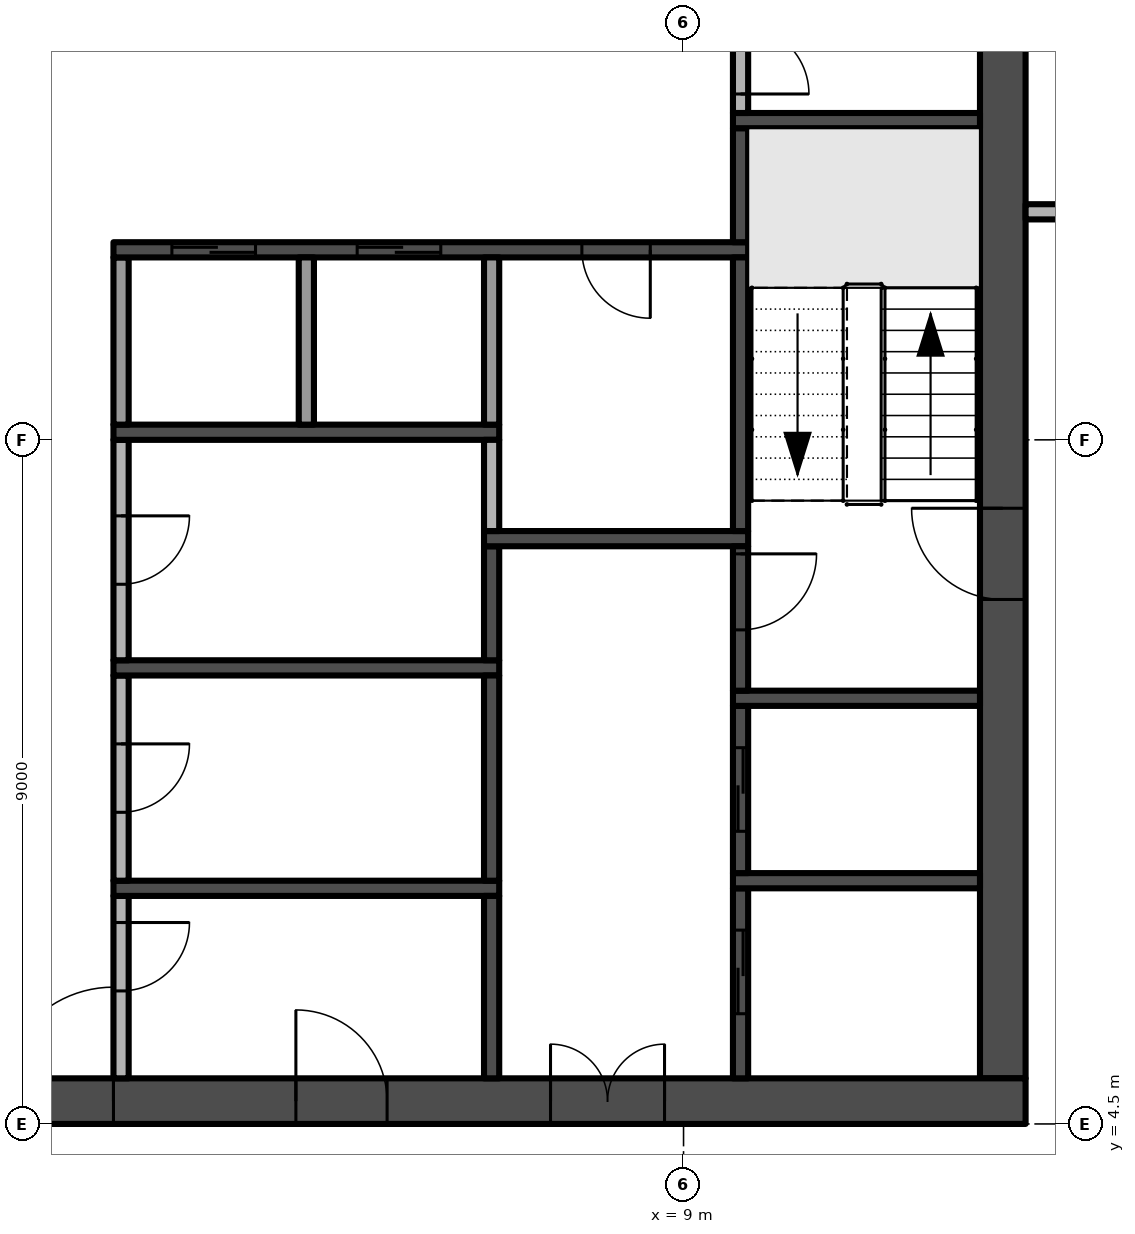
"""IFC4 building model, lengths in metres.
Left out: names, types, materials, properties, quantities, classifications, styles, units other than length and angle.
Written with IfcOpenShell. Run it as: python <this file> out.ifc"""

import sys

from ifc_helpers import new_model, si_unit, direction, frame, frame_2d, origin, place, context, subcontext, project, spatial, rectangle, extrude, element, fill, save


model = new_model("IFC4")
c1 = context("Model", 3, precision=1e-05, world=origin(), true_north=direction((0.0, 1.0)))
c2 = subcontext(c1, "Body", "Model", "MODEL_VIEW")
j1 = project(units=[si_unit("LENGTHUNIT", "METRE"), si_unit("PLANEANGLEUNIT", "RADIAN")], contexts=[c1])
p1 = place(None, origin())
s1 = spatial("IfcSite", under=j1, at=p1, CompositionType="ELEMENT")
p2 = place(p1, origin())
s2 = spatial("IfcBuilding", under=s1, at=p2, CompositionType="ELEMENT")
p3 = place(p2, frame((0.0, 0.0, 226.2)))
s3 = spatial("IfcBuildingStorey", under=s2, at=p3, CompositionType="ELEMENT", Elevation=226.2)
p4 = place(p3, frame((-13.5, 4.8, -0.3), z_axis=(0.0, 0.0, 1.0), x_axis=(1.0, 0.0, 0.0)))
e1 = element("IfcWall", 1, at=p4, inside=s3, PredefinedType="SHEAR", context=c2, shape_type="SweptSolid", body=[
    extrude(rectangle(XDim=27.0, YDim=0.6, at=frame_2d((13.5, 0.0))), origin(), (0.0, 0.0, 1.0), 3.8),
])
p5 = place(p4, frame((12.0, 0.0, 0.3)))
e2 = element("IfcOpeningElement", 2, at=p5, cuts=e1, PredefinedType="OPENING", context=c2, shape_type="SweptSolid", body=[
    extrude(rectangle(XDim=3.0, YDim=2.4, at=frame_2d((1.5, 1.2))), frame((0.0, 0.31, 0.0), z_axis=(0.0, -1.0, 0.0), x_axis=(1.0, 0.0, 0.0)), (0.0, 0.0, 1.0), 0.62),
])
p6 = place(p4, frame((4.9, 0.0, 0.3)))
e3 = element("IfcOpeningElement", 3, at=p6, cuts=e1, PredefinedType="OPENING", context=c2, shape_type="SweptSolid", body=[
    extrude(rectangle(XDim=1.2, YDim=2.2, at=frame_2d((0.6, 1.1))), frame((0.0, 0.31, 0.0), z_axis=(0.0, -1.0, 0.0), x_axis=(1.0, 0.0, 0.0)), (0.0, 0.0, 1.0), 0.62),
])
p7 = place(p4, frame((20.75, 0.0, 0.3)))
e4 = element("IfcOpeningElement", 4, at=p7, cuts=e1, PredefinedType="OPENING", context=c2, shape_type="SweptSolid", body=[
    extrude(rectangle(XDim=1.5, YDim=2.2, at=frame_2d((0.75, 1.1))), frame((0.0, 0.31, 0.0), z_axis=(0.0, -1.0, 0.0), x_axis=(1.0, 0.0, 0.0)), (0.0, 0.0, 1.0), 0.62),
])
p8 = place(p4, frame((17.4, 0.0, 0.3)))
e5 = element("IfcOpeningElement", 5, at=p8, cuts=e1, PredefinedType="OPENING", context=c2, shape_type="SweptSolid", body=[
    extrude(rectangle(XDim=1.2, YDim=2.2, at=frame_2d((0.6, 1.1))), frame((0.0, 0.31, 0.0), z_axis=(0.0, -1.0, 0.0), x_axis=(1.0, 0.0, 0.0)), (0.0, 0.0, 1.0), 0.62),
])
p9 = place(p3, frame((13.2, 5.1, -0.3), z_axis=(0.0, 0.0, 1.0), x_axis=(0.0, 1.0, 0.0)))
e6 = element("IfcWall", 6, at=p9, inside=s3, PredefinedType="SHEAR", context=c2, shape_type="SweptSolid", body=[
    extrude(rectangle(XDim=16.8, YDim=0.6, at=frame_2d((8.4, 0.0))), origin(), (0.0, 0.0, 1.0), 3.8),
])
p10 = place(p9, frame((6.3, 0.0, 0.3)))
e7 = element("IfcOpeningElement", 7, at=p10, cuts=e6, PredefinedType="OPENING", context=c2, shape_type="SweptSolid", body=[
    extrude(rectangle(XDim=1.2, YDim=2.2, at=frame_2d((0.6, 1.1))), frame((0.0, 0.31, 0.0), z_axis=(0.0, -1.0, 0.0), x_axis=(1.0, 0.0, 0.0)), (0.0, 0.0, 1.0), 0.62),
])
p11 = place(p3, frame((1.6, 7.5, 0.0), z_axis=(0.0, 0.0, 1.0), x_axis=(0.0, -1.0, 0.0)))
e8 = element("IfcWall", 8, at=p11, inside=s3, PredefinedType="PARTITIONING", context=c2, shape_type="SweptSolid", body=[
    extrude(rectangle(XDim=2.4, YDim=0.2, at=frame_2d((1.2, 0.0))), origin(), (0.0, 0.0, 1.0), 3.5),
])
p12 = place(p11, frame((0.35, 0.0, 0.0)))
e9 = element("IfcOpeningElement", 9, at=p12, cuts=e8, PredefinedType="OPENING", context=c2, shape_type="SweptSolid", body=[
    extrude(rectangle(XDim=0.9, YDim=2.1, at=frame_2d((0.45, 1.05))), frame((0.0, 0.11, 0.0), z_axis=(0.0, -1.0, 0.0), x_axis=(1.0, 0.0, 0.0)), (0.0, 0.0, 1.0), 0.22),
])
p13 = place(p3, frame((1.5, 7.6, 0.0), z_axis=(0.0, 0.0, 1.0), x_axis=(1.0, 0.0, 0.0)))
e10 = element("IfcWall", 10, at=p13, inside=s3, PredefinedType="SHEAR", context=c2, shape_type="SweptSolid", body=[
    extrude(rectangle(XDim=5.075, YDim=0.2, at=frame_2d((2.538, 0.0))), origin(), (0.0, 0.0, 1.0), 3.5),
])
p14 = place(p3, frame((1.6, 10.4, 0.0), z_axis=(0.0, 0.0, 1.0), x_axis=(0.0, -1.0, 0.0)))
e11 = element("IfcWall", 11, at=p14, inside=s3, PredefinedType="PARTITIONING", context=c2, shape_type="SweptSolid", body=[
    extrude(rectangle(XDim=2.7, YDim=0.2, at=frame_2d((1.35, 0.0))), origin(), (0.0, 0.0, 1.0), 3.5),
])
p15 = place(p14, frame((0.9, 0.0, 0.0)))
e12 = element("IfcOpeningElement", 12, at=p15, cuts=e11, PredefinedType="OPENING", context=c2, shape_type="SweptSolid", body=[
    extrude(rectangle(XDim=0.9, YDim=2.1, at=frame_2d((0.45, 1.05))), frame((0.0, 0.11, 0.0), z_axis=(0.0, -1.0, 0.0), x_axis=(1.0, 0.0, 0.0)), (0.0, 0.0, 1.0), 0.22),
])
p16 = place(p3, frame((1.5, 10.5, 0.0), z_axis=(0.0, 0.0, 1.0), x_axis=(1.0, 0.0, 0.0)))
e13 = element("IfcWall", 13, at=p16, inside=s3, PredefinedType="SHEAR", context=c2, shape_type="SweptSolid", body=[
    extrude(rectangle(XDim=5.075, YDim=0.2, at=frame_2d((2.538, 0.0))), origin(), (0.0, 0.0, 1.0), 3.5),
])
p17 = place(p3, frame((1.6, 13.5, 0.0), z_axis=(0.0, 0.0, 1.0), x_axis=(0.0, -1.0, 0.0)))
e14 = element("IfcWall", 14, at=p17, inside=s3, PredefinedType="PARTITIONING", context=c2, shape_type="SweptSolid", body=[
    extrude(rectangle(XDim=2.9, YDim=0.2, at=frame_2d((1.45, 0.0))), origin(), (0.0, 0.0, 1.0), 3.5),
])
p18 = place(p17, frame((1.0, 0.0, 0.0)))
e15 = element("IfcOpeningElement", 15, at=p18, cuts=e14, PredefinedType="OPENING", context=c2, shape_type="SweptSolid", body=[
    extrude(rectangle(XDim=0.9, YDim=2.1, at=frame_2d((0.45, 1.05))), frame((0.0, 0.11, 0.0), z_axis=(0.0, -1.0, 0.0), x_axis=(1.0, 0.0, 0.0)), (0.0, 0.0, 1.0), 0.22),
])
p19 = place(p3, frame((1.5, 13.6, 0.0), z_axis=(0.0, 0.0, 1.0), x_axis=(1.0, 0.0, 0.0)))
e16 = element("IfcWall", 16, at=p19, inside=s3, PredefinedType="SHEAR", context=c2, shape_type="SweptSolid", body=[
    extrude(rectangle(XDim=5.075, YDim=0.2, at=frame_2d((2.538, 0.0))), origin(), (0.0, 0.0, 1.0), 3.5),
])
p20 = place(p3, frame((1.6, 13.7, 0.0), z_axis=(0.0, 0.0, 1.0), x_axis=(0.0, 1.0, 0.0)))
e17 = element("IfcWall", 17, at=p20, inside=s3, PredefinedType="PARTITIONING", context=c2, shape_type="SweptSolid", body=[
    extrude(rectangle(XDim=2.2, YDim=0.2, at=frame_2d((1.1, 0.0))), origin(), (0.0, 0.0, 1.0), 3.5),
])
p21 = place(p3, frame((9.85, 16.0, 0.0), z_axis=(0.0, 0.0, 1.0), x_axis=(-1.0, 0.0, 0.0)))
e18 = element("IfcWall", 18, at=p21, inside=s3, PredefinedType="SHEAR", context=c2, shape_type="SweptSolid", body=[
    extrude(rectangle(XDim=8.35, YDim=0.2, at=frame_2d((4.175, 0.0))), origin(), (0.0, 0.0, 1.0), 3.5),
])
p22 = place(p21, frame((6.481, 0.0, 0.0)))
e19 = element("IfcOpeningElement", 19, at=p22, cuts=e18, PredefinedType="OPENING", context=c2, shape_type="SweptSolid", body=[
    extrude(rectangle(XDim=1.1, YDim=2.1, at=frame_2d((0.55, 1.05))), frame((0.0, 0.11, 0.0), z_axis=(0.0, -1.0, 0.0), x_axis=(1.0, 0.0, 0.0)), (0.0, 0.0, 1.0), 0.22),
])
p23 = place(p21, frame((4.044, 0.0, 0.0)))
e20 = element("IfcOpeningElement", 20, at=p23, cuts=e18, PredefinedType="OPENING", context=c2, shape_type="SweptSolid", body=[
    extrude(rectangle(XDim=1.1, YDim=2.1, at=frame_2d((0.55, 1.05))), frame((0.0, 0.11, 0.0), z_axis=(0.0, -1.0, 0.0), x_axis=(1.0, 0.0, 0.0)), (0.0, 0.0, 1.0), 0.22),
])
p24 = place(p21, frame((1.288, 0.0, 0.0)))
e21 = element("IfcOpeningElement", 21, at=p24, cuts=e18, PredefinedType="OPENING", context=c2, shape_type="SweptSolid", body=[
    extrude(rectangle(XDim=0.9, YDim=2.1, at=frame_2d((0.45, 1.05))), frame((0.0, 0.11, 0.0), z_axis=(0.0, -1.0, 0.0), x_axis=(1.0, 0.0, 0.0)), (0.0, 0.0, 1.0), 0.22),
])
p25 = place(p3, frame((4.037, 13.7, 0.0), z_axis=(0.0, 0.0, 1.0), x_axis=(0.0, 1.0, 0.0)))
e22 = element("IfcWall", 22, at=p25, inside=s3, PredefinedType="PARTITIONING", context=c2, shape_type="SweptSolid", body=[
    extrude(rectangle(XDim=2.2, YDim=0.2, at=frame_2d((1.1, 0.0))), origin(), (0.0, 0.0, 1.0), 3.5),
])
p26 = place(p3, frame((6.475, 5.1, 0.0), z_axis=(0.0, 0.0, 1.0), x_axis=(0.0, 1.0, 0.0)))
e23 = element("IfcWall", 23, at=p26, inside=s3, PredefinedType="SHEAR", context=c2, shape_type="SweptSolid", body=[
    extrude(rectangle(XDim=2.4, YDim=0.2, at=frame_2d((1.2, 0.0))), origin(), (0.0, 0.0, 1.0), 3.5),
])
p27 = place(p3, frame((6.475, 7.7, 0.0), z_axis=(0.0, 0.0, 1.0), x_axis=(0.0, 1.0, 0.0)))
e24 = element("IfcWall", 24, at=p27, inside=s3, PredefinedType="SHEAR", context=c2, shape_type="SweptSolid", body=[
    extrude(rectangle(XDim=2.7, YDim=0.2, at=frame_2d((1.35, 0.0))), origin(), (0.0, 0.0, 1.0), 3.5),
])
p28 = place(p3, frame((6.475, 10.6, 0.0), z_axis=(0.0, 0.0, 1.0), x_axis=(0.0, 1.0, 0.0)))
e25 = element("IfcWall", 25, at=p28, inside=s3, PredefinedType="SHEAR", context=c2, shape_type="SweptSolid", body=[
    extrude(rectangle(XDim=1.5, YDim=0.2, at=frame_2d((0.75, 0.0))), origin(), (0.0, 0.0, 1.0), 3.5),
])
p29 = place(p3, frame((6.375, 12.2, 0.0), z_axis=(0.0, 0.0, 1.0), x_axis=(1.0, 0.0, 0.0)))
e26 = element("IfcWall", 26, at=p29, inside=s3, PredefinedType="SHEAR", context=c2, shape_type="SweptSolid", body=[
    extrude(rectangle(XDim=3.475, YDim=0.2, at=frame_2d((1.738, 0.0))), origin(), (0.0, 0.0, 1.0), 3.5),
])
p30 = place(p3, frame((6.475, 12.3, 0.0), z_axis=(0.0, 0.0, 1.0), x_axis=(0.0, 1.0, 0.0)))
e27 = element("IfcWall", 27, at=p30, inside=s3, PredefinedType="PARTITIONING", context=c2, shape_type="SweptSolid", body=[
    extrude(rectangle(XDim=1.2, YDim=0.2, at=frame_2d((0.6, 0.0))), origin(), (0.0, 0.0, 1.0), 3.5),
])
p31 = place(p3, frame((6.475, 13.7, 0.0), z_axis=(0.0, 0.0, 1.0), x_axis=(0.0, 1.0, 0.0)))
e28 = element("IfcWall", 28, at=p31, inside=s3, PredefinedType="PARTITIONING", context=c2, shape_type="SweptSolid", body=[
    extrude(rectangle(XDim=2.2, YDim=0.2, at=frame_2d((1.1, 0.0))), origin(), (0.0, 0.0, 1.0), 3.5),
])
p32 = place(p3, frame((9.75, 5.1, 0.0), z_axis=(0.0, 0.0, 1.0), x_axis=(0.0, 1.0, 0.0)))
e29 = element("IfcWall", 29, at=p32, inside=s3, PredefinedType="SHEAR", context=c2, shape_type="SweptSolid", body=[
    extrude(rectangle(XDim=2.5, YDim=0.2, at=frame_2d((1.25, 0.0))), origin(), (0.0, 0.0, 1.0), 3.5),
])
p33 = place(p32, frame((0.85, 0.0, 0.0)))
e30 = element("IfcOpeningElement", 30, at=p33, cuts=e29, PredefinedType="OPENING", context=c2, shape_type="SweptSolid", body=[
    extrude(rectangle(XDim=1.1, YDim=2.1, at=frame_2d((0.55, 1.05))), frame((0.0, 0.11, 0.0), z_axis=(0.0, -1.0, 0.0), x_axis=(1.0, 0.0, 0.0)), (0.0, 0.0, 1.0), 0.22),
])
p34 = place(p3, frame((9.65, 7.7, 0.0), z_axis=(0.0, 0.0, 1.0), x_axis=(1.0, 0.0, 0.0)))
e31 = element("IfcWall", 31, at=p34, inside=s3, PredefinedType="SHEAR", context=c2, shape_type="SweptSolid", body=[
    extrude(rectangle(XDim=3.25, YDim=0.2, at=frame_2d((1.625, 0.0))), origin(), (0.0, 0.0, 1.0), 3.5),
])
p35 = place(p3, frame((9.75, 7.8, 0.0), z_axis=(0.0, 0.0, 1.0), x_axis=(0.0, 1.0, 0.0)))
e32 = element("IfcWall", 32, at=p35, inside=s3, PredefinedType="SHEAR", context=c2, shape_type="SweptSolid", body=[
    extrude(rectangle(XDim=2.2, YDim=0.2, at=frame_2d((1.1, 0.0))), origin(), (0.0, 0.0, 1.0), 3.5),
])
p36 = place(p35, frame((0.55, 0.0, 0.0)))
e33 = element("IfcOpeningElement", 33, at=p36, cuts=e32, PredefinedType="OPENING", context=c2, shape_type="SweptSolid", body=[
    extrude(rectangle(XDim=1.1, YDim=2.1, at=frame_2d((0.55, 1.05))), frame((0.0, 0.11, 0.0), z_axis=(0.0, -1.0, 0.0), x_axis=(1.0, 0.0, 0.0)), (0.0, 0.0, 1.0), 0.22),
])
p37 = place(p3, frame((9.65, 10.1, 0.0), z_axis=(0.0, 0.0, 1.0), x_axis=(1.0, 0.0, 0.0)))
e34 = element("IfcWall", 34, at=p37, inside=s3, PredefinedType="SHEAR", context=c2, shape_type="SweptSolid", body=[
    extrude(rectangle(XDim=3.25, YDim=0.2, at=frame_2d((1.625, 0.0))), origin(), (0.0, 0.0, 1.0), 3.5),
])
p38 = place(p3, frame((9.75, 12.1, 0.0), z_axis=(0.0, 0.0, 1.0), x_axis=(0.0, -1.0, 0.0)))
e35 = element("IfcWall", 35, at=p38, inside=s3, PredefinedType="SHEAR", context=c2, shape_type="SweptSolid", body=[
    extrude(rectangle(XDim=1.9, YDim=0.2, at=frame_2d((0.95, 0.0))), origin(), (0.0, 0.0, 1.0), 3.5),
])
p39 = place(p38, frame((0.1, 0.0, 0.0)))
e36 = element("IfcOpeningElement", 36, at=p39, cuts=e35, PredefinedType="OPENING", context=c2, shape_type="SweptSolid", body=[
    extrude(rectangle(XDim=1.0, YDim=2.2, at=frame_2d((0.5, 1.1))), frame((0.0, 0.11, 0.0), z_axis=(0.0, -1.0, 0.0), x_axis=(1.0, 0.0, 0.0)), (0.0, 0.0, 1.0), 0.22),
])
p40 = place(p3, frame((9.75, 12.3, 0.0), z_axis=(0.0, 0.0, 1.0), x_axis=(0.0, 1.0, 0.0)))
e37 = element("IfcWall", 37, at=p40, inside=s3, PredefinedType="SHEAR", context=c2, shape_type="SweptSolid", body=[
    extrude(rectangle(XDim=3.6, YDim=0.2, at=frame_2d((1.8, 0.0))), origin(), (0.0, 0.0, 1.0), 3.5),
])
p41 = place(p3, frame((9.75, 16.1, 0.0), z_axis=(0.0, 0.0, 1.0), x_axis=(0.0, 1.0, 0.0)))
e38 = element("IfcWall", 38, at=p41, inside=s3, PredefinedType="SHEAR", context=c2, shape_type="SweptSolid", body=[
    extrude(rectangle(XDim=1.5, YDim=0.2, at=frame_2d((0.75, 0.0))), origin(), (0.0, 0.0, 1.0), 3.5),
])
p42 = place(p3, frame((9.65, 17.7, 0.0), z_axis=(0.0, 0.0, 1.0), x_axis=(1.0, 0.0, 0.0)))
e39 = element("IfcWall", 39, at=p42, inside=s3, PredefinedType="SHEAR", context=c2, shape_type="SweptSolid", body=[
    extrude(rectangle(XDim=3.25, YDim=0.2, at=frame_2d((1.625, 0.0))), origin(), (0.0, 0.0, 1.0), 3.5),
])
p43 = place(p3, frame((9.75, 19.2, 0.0), z_axis=(0.0, 0.0, 1.0), x_axis=(0.0, -1.0, 0.0)))
e40 = element("IfcWall", 40, at=p43, inside=s3, PredefinedType="PARTITIONING", context=c2, shape_type="SweptSolid", body=[
    extrude(rectangle(XDim=1.4, YDim=0.2, at=frame_2d((0.7, 0.0))), origin(), (0.0, 0.0, 1.0), 3.5),
])
p44 = place(p43, frame((0.25, 0.0, 0.0)))
e41 = element("IfcOpeningElement", 41, at=p44, cuts=e40, PredefinedType="OPENING", context=c2, shape_type="SweptSolid", body=[
    extrude(rectangle(XDim=0.9, YDim=2.1, at=frame_2d((0.45, 1.05))), frame((0.0, 0.11, 0.0), z_axis=(0.0, -1.0, 0.0), x_axis=(1.0, 0.0, 0.0)), (0.0, 0.0, 1.0), 0.22),
])
p45 = place(p3, frame((13.5, 16.5, 0.0), z_axis=(0.0, 0.0, 1.0), x_axis=(1.0, 0.0, 0.0)))
e42 = element("IfcWall", 42, at=p45, inside=s3, PredefinedType="PARTITIONING", context=c2, shape_type="SweptSolid", body=[
    extrude(rectangle(XDim=3.825, YDim=0.2, at=frame_2d((1.913, 0.0))), origin(), (0.0, 0.0, 1.0), 3.5),
])
p46 = place(p45, frame((1.55, 0.0, 0.0)))
e43 = element("IfcOpeningElement", 43, at=p46, cuts=e42, PredefinedType="OPENING", context=c2, shape_type="SweptSolid", body=[
    extrude(rectangle(XDim=0.9, YDim=2.1, at=frame_2d((0.45, 1.05))), frame((0.0, 0.11, 0.0), z_axis=(0.0, -1.0, 0.0), x_axis=(1.0, 0.0, 0.0)), (0.0, 0.0, 1.0), 0.22),
])
p47 = place(p5, frame((3.0, 0.0, 0.0), z_axis=(0.0, 0.0, 1.0), x_axis=(-1.0, 0.0, 0.0)))
e44 = element("IfcDoor", 44, at=p47, inside=s3, OperationType="DOUBLE_DOOR_SINGLE_SWING", PredefinedType="DOOR", context=c2, shape_type="SweptSolid", body=[
    extrude(rectangle(XDim=3.0, YDim=2.4, at=frame_2d((1.5, 1.2))), frame((0.0, 0.025, 0.0), z_axis=(0.0, -1.0, 0.0), x_axis=(1.0, 0.0, 0.0)), (0.0, 0.0, 1.0), 0.05),
])
fill(e2, e44)
p48 = place(p10, frame((1.2, 0.0, 0.0), z_axis=(0.0, 0.0, 1.0), x_axis=(-1.0, 0.0, 0.0)))
e45 = element("IfcDoor", 45, at=p48, inside=s3, OperationType="SINGLE_SWING_LEFT", PredefinedType="DOOR", context=c2, shape_type="SweptSolid", body=[
    extrude(rectangle(XDim=1.2, YDim=2.2, at=frame_2d((0.6, 1.1))), frame((0.0, 0.025, 0.0), z_axis=(0.0, -1.0, 0.0), x_axis=(1.0, 0.0, 0.0)), (0.0, 0.0, 1.0), 0.05),
])
fill(e7, e45)
p49 = place(p7, frame((1.5, 0.0, 0.0), z_axis=(0.0, 0.0, 1.0), x_axis=(-1.0, 0.0, 0.0)))
e46 = element("IfcDoor", 46, at=p49, inside=s3, OperationType="DOUBLE_DOOR_SINGLE_SWING", PredefinedType="DOOR", context=c2, shape_type="SweptSolid", body=[
    extrude(rectangle(XDim=1.5, YDim=2.2, at=frame_2d((0.75, 1.1))), frame((0.0, 0.025, 0.0), z_axis=(0.0, -1.0, 0.0), x_axis=(1.0, 0.0, 0.0)), (0.0, 0.0, 1.0), 0.05),
])
fill(e4, e46)
p50 = place(p8, frame((1.2, 0.0, 0.0), z_axis=(0.0, 0.0, 1.0), x_axis=(-1.0, 0.0, 0.0)))
e47 = element("IfcDoor", 47, at=p50, inside=s3, OperationType="SINGLE_SWING_RIGHT", PredefinedType="DOOR", context=c2, shape_type="SweptSolid", body=[
    extrude(rectangle(XDim=1.2, YDim=2.2, at=frame_2d((0.6, 1.1))), frame((0.0, 0.025, 0.0), z_axis=(0.0, -1.0, 0.0), x_axis=(1.0, 0.0, 0.0)), (0.0, 0.0, 1.0), 0.05),
])
fill(e5, e47)
p51 = place(p39, origin())
e48 = element("IfcDoor", 48, at=p51, inside=s3, OperationType="SINGLE_SWING_LEFT", PredefinedType="DOOR", context=c2, shape_type="SweptSolid", body=[
    extrude(rectangle(XDim=1.0, YDim=2.2, at=frame_2d((0.5, 1.1))), frame((0.0, 0.025, 0.0), z_axis=(0.0, -1.0, 0.0), x_axis=(1.0, 0.0, 0.0)), (0.0, 0.0, 1.0), 0.05),
])
fill(e36, e48)
p52 = place(p22, origin())
e49 = element("IfcDoor", 49, at=p52, inside=s3, OperationType="SLIDING_TO_RIGHT", PredefinedType="DOOR", context=c2, shape_type="SweptSolid", body=[
    extrude(rectangle(XDim=1.1, YDim=2.1, at=frame_2d((0.55, 1.05))), frame((0.0, 0.025, 0.0), z_axis=(0.0, -1.0, 0.0), x_axis=(1.0, 0.0, 0.0)), (0.0, 0.0, 1.0), 0.05),
])
fill(e19, e49)
p53 = place(p23, origin())
e50 = element("IfcDoor", 50, at=p53, inside=s3, OperationType="SLIDING_TO_RIGHT", PredefinedType="DOOR", context=c2, shape_type="SweptSolid", body=[
    extrude(rectangle(XDim=1.1, YDim=2.1, at=frame_2d((0.55, 1.05))), frame((0.0, 0.025, 0.0), z_axis=(0.0, -1.0, 0.0), x_axis=(1.0, 0.0, 0.0)), (0.0, 0.0, 1.0), 0.05),
])
fill(e20, e50)
p54 = place(p33, origin())
e51 = element("IfcDoor", 51, at=p54, inside=s3, OperationType="SLIDING_TO_RIGHT", PredefinedType="DOOR", context=c2, shape_type="SweptSolid", body=[
    extrude(rectangle(XDim=1.1, YDim=2.1, at=frame_2d((0.55, 1.05))), frame((0.0, 0.025, 0.0), z_axis=(0.0, -1.0, 0.0), x_axis=(1.0, 0.0, 0.0)), (0.0, 0.0, 1.0), 0.05),
])
fill(e30, e51)
p55 = place(p36, origin())
e52 = element("IfcDoor", 52, at=p55, inside=s3, OperationType="SLIDING_TO_RIGHT", PredefinedType="DOOR", context=c2, shape_type="SweptSolid", body=[
    extrude(rectangle(XDim=1.1, YDim=2.1, at=frame_2d((0.55, 1.05))), frame((0.0, 0.025, 0.0), z_axis=(0.0, -1.0, 0.0), x_axis=(1.0, 0.0, 0.0)), (0.0, 0.0, 1.0), 0.05),
])
fill(e33, e52)
p56 = place(p12, origin())
e53 = element("IfcDoor", 53, at=p56, inside=s3, OperationType="SINGLE_SWING_LEFT", PredefinedType="DOOR", context=c2, shape_type="SweptSolid", body=[
    extrude(rectangle(XDim=0.9, YDim=2.1, at=frame_2d((0.45, 1.05))), frame((0.0, 0.025, 0.0), z_axis=(0.0, -1.0, 0.0), x_axis=(1.0, 0.0, 0.0)), (0.0, 0.0, 1.0), 0.05),
])
fill(e9, e53)
p57 = place(p15, origin())
e54 = element("IfcDoor", 54, at=p57, inside=s3, OperationType="SINGLE_SWING_LEFT", PredefinedType="DOOR", context=c2, shape_type="SweptSolid", body=[
    extrude(rectangle(XDim=0.9, YDim=2.1, at=frame_2d((0.45, 1.05))), frame((0.0, 0.025, 0.0), z_axis=(0.0, -1.0, 0.0), x_axis=(1.0, 0.0, 0.0)), (0.0, 0.0, 1.0), 0.05),
])
fill(e12, e54)
p58 = place(p18, origin())
e55 = element("IfcDoor", 55, at=p58, inside=s3, OperationType="SINGLE_SWING_LEFT", PredefinedType="DOOR", context=c2, shape_type="SweptSolid", body=[
    extrude(rectangle(XDim=0.9, YDim=2.1, at=frame_2d((0.45, 1.05))), frame((0.0, 0.025, 0.0), z_axis=(0.0, -1.0, 0.0), x_axis=(1.0, 0.0, 0.0)), (0.0, 0.0, 1.0), 0.05),
])
fill(e15, e55)
p59 = place(p24, origin())
e56 = element("IfcDoor", 56, at=p59, inside=s3, OperationType="SINGLE_SWING_LEFT", PredefinedType="DOOR", context=c2, shape_type="SweptSolid", body=[
    extrude(rectangle(XDim=0.9, YDim=2.1, at=frame_2d((0.45, 1.05))), frame((0.0, 0.025, 0.0), z_axis=(0.0, -1.0, 0.0), x_axis=(1.0, 0.0, 0.0)), (0.0, 0.0, 1.0), 0.05),
])
fill(e21, e56)
p60 = place(p44, origin())
e57 = element("IfcDoor", 57, at=p60, inside=s3, OperationType="SINGLE_SWING_RIGHT", PredefinedType="DOOR", context=c2, shape_type="SweptSolid", body=[
    extrude(rectangle(XDim=0.9, YDim=2.1, at=frame_2d((0.45, 1.05))), frame((0.0, 0.025, 0.0), z_axis=(0.0, -1.0, 0.0), x_axis=(1.0, 0.0, 0.0)), (0.0, 0.0, 1.0), 0.05),
])
fill(e41, e57)
save(model, sys.argv[1])
